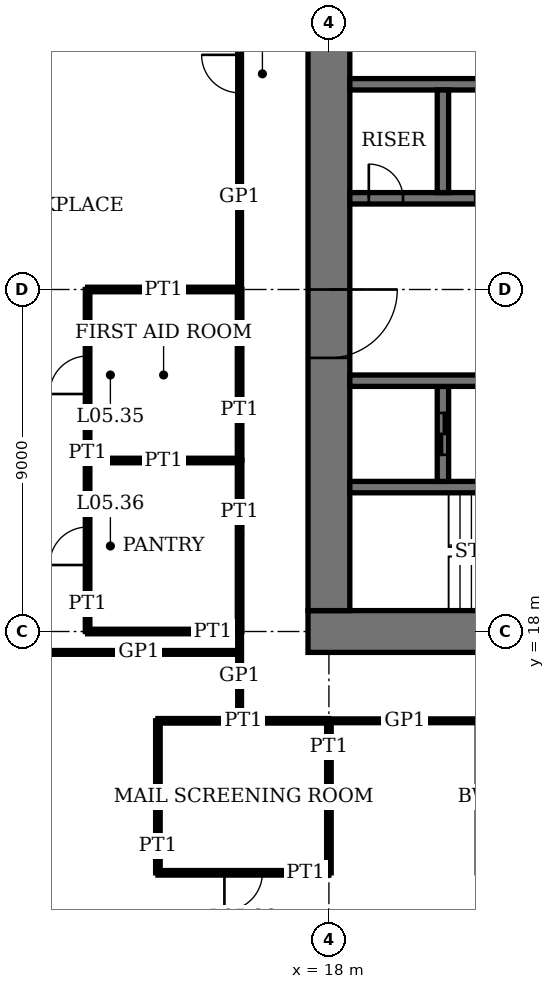
"""IFC4 building model, lengths in metres.
Left out: names, types, materials, properties, quantities, classifications, styles, units other than length and angle.
Written with IfcOpenShell. Run it as: python <this file> out.ifc"""

import sys

from ifc_helpers import new_model, si_unit, direction, frame, frame_2d, origin, place, context, subcontext, project, spatial, rectangle, extrude, element, fill, save


model = new_model("IFC4")
c1 = context("Model", 3, precision=1e-05, world=origin(), true_north=direction((0.0, 1.0)))
c2 = subcontext(c1, "Body", "Model", "MODEL_VIEW")
j1 = project(units=[si_unit("LENGTHUNIT", "METRE"), si_unit("PLANEANGLEUNIT", "RADIAN")], contexts=[c1])
p1 = place(None, origin())
s1 = spatial("IfcSite", under=j1, at=p1, CompositionType="ELEMENT")
p2 = place(p1, origin())
s2 = spatial("IfcBuilding", under=s1, at=p2, CompositionType="ELEMENT")
p3 = place(p2, frame((0.0, 0.0, 23.8)))
s3 = spatial("IfcBuildingStorey", under=s2, at=p3, CompositionType="ELEMENT", Elevation=23.8)
p4 = place(p3, frame((17.45, 18.0, 0.0), z_axis=(0.0, 0.0, 1.0), x_axis=(1.0, 0.0, 0.0)))
e1 = element("IfcWall", 1, at=p4, inside=s3, PredefinedType="SHEAR", context=c2, shape_type="SweptSolid", body=[
    extrude(rectangle(XDim=28.1, YDim=1.1, at=frame_2d((14.05, 0.0))), origin(), (0.0, 0.0, 1.0), 4.0),
])
p5 = place(p4, frame((11.55, 0.0, 0.0)))
e2 = element("IfcOpeningElement", 2, at=p5, cuts=e1, PredefinedType="OPENING", context=c2, shape_type="SweptSolid", body=[
    extrude(rectangle(XDim=1.0, YDim=2.4, at=frame_2d((0.5, 1.2))), frame((0.0, 0.56, 0.0), z_axis=(0.0, -1.0, 0.0), x_axis=(1.0, 0.0, 0.0)), (0.0, 0.0, 1.0), 1.12),
])
p6 = place(p4, frame((16.55, 0.0, 0.0)))
e3 = element("IfcOpeningElement", 3, at=p6, cuts=e1, PredefinedType="OPENING", context=c2, shape_type="SweptSolid", body=[
    extrude(rectangle(XDim=1.0, YDim=2.4, at=frame_2d((0.5, 1.2))), frame((0.0, 0.56, 0.0), z_axis=(0.0, -1.0, 0.0), x_axis=(1.0, 0.0, 0.0)), (0.0, 0.0, 1.0), 1.12),
])
p7 = place(p4, frame((20.0, 0.0, 0.0)))
e4 = element("IfcOpeningElement", 4, at=p7, cuts=e1, PredefinedType="OPENING", context=c2, shape_type="SweptSolid", body=[
    extrude(rectangle(XDim=1.1, YDim=2.4, at=frame_2d((0.55, 1.2))), frame((0.0, 0.56, 0.0), z_axis=(0.0, -1.0, 0.0), x_axis=(1.0, 0.0, 0.0)), (0.0, 0.0, 1.0), 1.12),
])
p8 = place(p4, frame((24.05, 0.0, 0.0)))
e5 = element("IfcOpeningElement", 5, at=p8, cuts=e1, PredefinedType="OPENING", context=c2, shape_type="SweptSolid", body=[
    extrude(rectangle(XDim=1.0, YDim=2.4, at=frame_2d((0.5, 1.2))), frame((0.0, 0.56, 0.0), z_axis=(0.0, -1.0, 0.0), x_axis=(1.0, 0.0, 0.0)), (0.0, 0.0, 1.0), 1.12),
])
p9 = place(p3, frame((18.0, 35.45, 0.0), z_axis=(0.0, 0.0, 1.0), x_axis=(0.0, -1.0, 0.0)))
e6 = element("IfcWall", 6, at=p9, inside=s3, PredefinedType="SHEAR", context=c2, shape_type="SweptSolid", body=[
    extrude(rectangle(XDim=16.9, YDim=1.1, at=frame_2d((8.45, 0.0))), origin(), (0.0, 0.0, 1.0), 4.0),
])
p10 = place(p9, frame((8.45, 0.0, 0.0)))
e7 = element("IfcOpeningElement", 7, at=p10, cuts=e6, PredefinedType="OPENING", context=c2, shape_type="SweptSolid", body=[
    extrude(rectangle(XDim=1.8, YDim=2.4, at=frame_2d((0.9, 1.2))), frame((0.0, 0.56, 0.0), z_axis=(0.0, -1.0, 0.0), x_axis=(1.0, 0.0, 0.0)), (0.0, 0.0, 1.0), 1.12),
])
p11 = place(p3, frame((18.55, 21.8, 0.0), z_axis=(0.0, 0.0, 1.0), x_axis=(1.0, 0.0, 0.0)))
e8 = element("IfcWall", 8, at=p11, inside=s3, PredefinedType="SHEAR", context=c2, shape_type="SweptSolid", body=[
    extrude(rectangle(XDim=8.3, YDim=0.3, at=frame_2d((4.15, 0.0))), origin(), (0.0, 0.0, 1.0), 4.0),
])
p12 = place(p11, frame((6.85, 0.0, 0.0)))
e9 = element("IfcOpeningElement", 9, at=p12, cuts=e8, PredefinedType="OPENING", context=c2, shape_type="SweptSolid", body=[
    extrude(rectangle(XDim=1.0, YDim=2.4, at=frame_2d((0.5, 1.2))), frame((0.0, 0.16, 0.0), z_axis=(0.0, -1.0, 0.0), x_axis=(1.0, 0.0, 0.0)), (0.0, 0.0, 1.0), 0.32),
])
p13 = place(p3, frame((21.0, 21.95, 0.0), z_axis=(0.0, 0.0, 1.0), x_axis=(0.0, 1.0, 0.0)))
e10 = element("IfcWall", 10, at=p13, inside=s3, PredefinedType="SHEAR", context=c2, shape_type="SweptSolid", body=[
    extrude(rectangle(XDim=2.5, YDim=0.3, at=frame_2d((1.25, 0.0))), origin(), (0.0, 0.0, 1.0), 4.0),
])
p14 = place(p13, frame((0.7, 0.0, 0.0)))
e11 = element("IfcOpeningElement", 11, at=p14, cuts=e10, PredefinedType="OPENING", context=c2, shape_type="SweptSolid", body=[
    extrude(rectangle(XDim=1.1, YDim=2.4, at=frame_2d((0.55, 1.2))), frame((0.0, 0.16, 0.0), z_axis=(0.0, -1.0, 0.0), x_axis=(1.0, 0.0, 0.0)), (0.0, 0.0, 1.0), 0.32),
])
p15 = place(p3, frame((18.55, 24.6, 0.0), z_axis=(0.0, 0.0, 1.0), x_axis=(1.0, 0.0, 0.0)))
e12 = element("IfcWall", 12, at=p15, inside=s3, PredefinedType="SHEAR", context=c2, shape_type="SweptSolid", body=[
    extrude(rectangle(XDim=25.9, YDim=0.3, at=frame_2d((12.95, 0.0))), origin(), (0.0, 0.0, 1.0), 4.0),
])
p16 = place(p15, frame((4.95, 0.0, 0.0)))
e13 = element("IfcOpeningElement", 13, at=p16, cuts=e12, PredefinedType="OPENING", context=c2, shape_type="SweptSolid", body=[
    extrude(rectangle(XDim=1.0, YDim=2.4, at=frame_2d((0.5, 1.2))), frame((0.0, 0.16, 0.0), z_axis=(0.0, -1.0, 0.0), x_axis=(1.0, 0.0, 0.0)), (0.0, 0.0, 1.0), 0.32),
])
p17 = place(p15, frame((24.5, 0.0, 0.0)))
e14 = element("IfcOpeningElement", 14, at=p17, cuts=e12, PredefinedType="OPENING", context=c2, shape_type="SweptSolid", body=[
    extrude(rectangle(XDim=0.9, YDim=2.1, at=frame_2d((0.45, 1.05))), frame((0.0, 0.16, 0.0), z_axis=(0.0, -1.0, 0.0), x_axis=(1.0, 0.0, 0.0)), (0.0, 0.0, 1.0), 0.32),
])
p18 = place(p15, frame((9.4, 0.0, 0.0)))
e15 = element("IfcOpeningElement", 15, at=p18, cuts=e12, PredefinedType="OPENING", context=c2, shape_type="SweptSolid", body=[
    extrude(rectangle(XDim=1.1, YDim=2.4, at=frame_2d((0.55, 1.2))), frame((0.0, 0.16, 0.0), z_axis=(0.0, -1.0, 0.0), x_axis=(1.0, 0.0, 0.0)), (0.0, 0.0, 1.0), 0.32),
])
p19 = place(p15, frame((12.4, 0.0, 0.0)))
e16 = element("IfcOpeningElement", 16, at=p19, cuts=e12, PredefinedType="OPENING", context=c2, shape_type="SweptSolid", body=[
    extrude(rectangle(XDim=1.1, YDim=2.4, at=frame_2d((0.55, 1.2))), frame((0.0, 0.16, 0.0), z_axis=(0.0, -1.0, 0.0), x_axis=(1.0, 0.0, 0.0)), (0.0, 0.0, 1.0), 0.32),
])
p20 = place(p15, frame((15.4, 0.0, 0.0)))
e17 = element("IfcOpeningElement", 17, at=p20, cuts=e12, PredefinedType="OPENING", context=c2, shape_type="SweptSolid", body=[
    extrude(rectangle(XDim=1.1, YDim=2.4, at=frame_2d((0.55, 1.2))), frame((0.0, 0.16, 0.0), z_axis=(0.0, -1.0, 0.0), x_axis=(1.0, 0.0, 0.0)), (0.0, 0.0, 1.0), 0.32),
])
p21 = place(p15, frame((18.4, 0.0, 0.0)))
e18 = element("IfcOpeningElement", 18, at=p21, cuts=e12, PredefinedType="OPENING", context=c2, shape_type="SweptSolid", body=[
    extrude(rectangle(XDim=1.1, YDim=2.4, at=frame_2d((0.55, 1.2))), frame((0.0, 0.16, 0.0), z_axis=(0.0, -1.0, 0.0), x_axis=(1.0, 0.0, 0.0)), (0.0, 0.0, 1.0), 0.32),
])
p22 = place(p15, frame((21.3, 0.0, 0.0)))
e19 = element("IfcOpeningElement", 19, at=p22, cuts=e12, PredefinedType="OPENING", context=c2, shape_type="SweptSolid", body=[
    extrude(rectangle(XDim=1.3, YDim=2.4, at=frame_2d((0.65, 1.2))), frame((0.0, 0.16, 0.0), z_axis=(0.0, -1.0, 0.0), x_axis=(1.0, 0.0, 0.0)), (0.0, 0.0, 1.0), 0.32),
])
p23 = place(p3, frame((18.55, 29.4, 0.0), z_axis=(0.0, 0.0, 1.0), x_axis=(1.0, 0.0, 0.0)))
e20 = element("IfcWall", 20, at=p23, inside=s3, PredefinedType="SHEAR", context=c2, shape_type="SweptSolid", body=[
    extrude(rectangle(XDim=25.9, YDim=0.3, at=frame_2d((12.95, 0.0))), origin(), (0.0, 0.0, 1.0), 4.0),
])
p24 = place(p23, frame((19.95, 0.0, 0.0)))
e21 = element("IfcOpeningElement", 21, at=p24, cuts=e20, PredefinedType="OPENING", context=c2, shape_type="SweptSolid", body=[
    extrude(rectangle(XDim=1.0, YDim=2.4, at=frame_2d((0.5, 1.2))), frame((0.0, 0.16, 0.0), z_axis=(0.0, -1.0, 0.0), x_axis=(1.0, 0.0, 0.0)), (0.0, 0.0, 1.0), 0.32),
])
p25 = place(p23, frame((0.5, 0.0, 0.0)))
e22 = element("IfcOpeningElement", 22, at=p25, cuts=e20, PredefinedType="OPENING", context=c2, shape_type="SweptSolid", body=[
    extrude(rectangle(XDim=0.9, YDim=2.1, at=frame_2d((0.45, 1.05))), frame((0.0, 0.16, 0.0), z_axis=(0.0, -1.0, 0.0), x_axis=(1.0, 0.0, 0.0)), (0.0, 0.0, 1.0), 0.32),
])
p26 = place(p23, frame((3.3, 0.0, 0.0)))
e23 = element("IfcOpeningElement", 23, at=p26, cuts=e20, PredefinedType="OPENING", context=c2, shape_type="SweptSolid", body=[
    extrude(rectangle(XDim=1.3, YDim=2.4, at=frame_2d((0.65, 1.2))), frame((0.0, 0.16, 0.0), z_axis=(0.0, -1.0, 0.0), x_axis=(1.0, 0.0, 0.0)), (0.0, 0.0, 1.0), 0.32),
])
p27 = place(p3, frame((18.55, 32.4, 0.0), z_axis=(0.0, 0.0, 1.0), x_axis=(1.0, 0.0, 0.0)))
e24 = element("IfcWall", 24, at=p27, inside=s3, PredefinedType="SHEAR", context=c2, shape_type="SweptSolid", body=[
    extrude(rectangle(XDim=17.3, YDim=0.3, at=frame_2d((8.65, 0.0))), origin(), (0.0, 0.0, 1.0), 4.0),
])
p28 = place(p3, frame((21.0, 29.55, 0.0), z_axis=(0.0, 0.0, 1.0), x_axis=(0.0, 1.0, 0.0)))
e25 = element("IfcWall", 25, at=p28, inside=s3, PredefinedType="SHEAR", context=c2, shape_type="SweptSolid", body=[
    extrude(rectangle(XDim=2.7, YDim=0.3, at=frame_2d((1.35, 0.0))), origin(), (0.0, 0.0, 1.0), 4.0),
])
p29 = place(p3, frame((13.5, 11.65, 0.0), z_axis=(0.0, 0.0, 1.0), x_axis=(1.0, 0.0, 0.0)))
e26 = element("IfcWall", 26, at=p29, inside=s3, PredefinedType="PARTITIONING", context=c2, shape_type="SweptSolid", body=[
    extrude(rectangle(XDim=4.5, YDim=0.12, at=frame_2d((2.25, 0.0))), origin(), (0.0, 0.0, 1.0), 3.75),
])
p30 = place(p29, frame((1.75, 0.0, 0.0)))
e27 = element("IfcOpeningElement", 27, at=p30, cuts=e26, PredefinedType="OPENING", context=c2, shape_type="SweptSolid", body=[
    extrude(rectangle(XDim=1.0, YDim=2.4, at=frame_2d((0.5, 1.2))), frame((0.0, 0.07, 0.0), z_axis=(0.0, -1.0, 0.0), x_axis=(1.0, 0.0, 0.0)), (0.0, 0.0, 1.0), 0.14),
])
p31 = place(p3, frame((13.5, 15.65, 0.0), z_axis=(0.0, 0.0, 1.0), x_axis=(1.0, 0.0, 0.0)))
e28 = element("IfcWall", 28, at=p31, inside=s3, PredefinedType="PARTITIONING", context=c2, shape_type="SweptSolid", body=[
    extrude(rectangle(XDim=4.5, YDim=0.12, at=frame_2d((2.25, 0.0))), origin(), (0.0, 0.0, 1.0), 3.75),
])
p32 = place(p3, frame((18.0, 15.65, 0.0), z_axis=(0.0, 0.0, 1.0), x_axis=(1.0, 0.0, 0.0)))
e29 = element("IfcWall", 29, at=p32, inside=s3, PredefinedType="PARTITIONING", context=c2, shape_type="SweptSolid", body=[
    extrude(rectangle(XDim=4.0, YDim=0.1, at=frame_2d((2.0, 0.0))), origin(), (0.0, 0.0, 1.0), 3.75),
])
p33 = place(p3, frame((10.15, 17.45, 0.0), z_axis=(0.0, 0.0, 1.0), x_axis=(1.0, 0.0, 0.0)))
e30 = element("IfcWall", 30, at=p33, inside=s3, PredefinedType="PARTITIONING", context=c2, shape_type="SweptSolid", body=[
    extrude(rectangle(XDim=5.5, YDim=0.1, at=frame_2d((2.75, 0.0))), origin(), (0.0, 0.0, 1.0), 3.75),
])
p34 = place(p3, frame((11.65, 18.0, 0.0), z_axis=(0.0, 0.0, 1.0), x_axis=(1.0, 0.0, 0.0)))
e31 = element("IfcWall", 31, at=p34, inside=s3, PredefinedType="PARTITIONING", context=c2, shape_type="SweptSolid", body=[
    extrude(rectangle(XDim=4.0, YDim=0.12, at=frame_2d((2.0, 0.0))), origin(), (0.0, 0.0, 1.0), 3.05),
])
p35 = place(p3, frame((11.65, 22.5, 0.0), z_axis=(0.0, 0.0, 1.0), x_axis=(1.0, 0.0, 0.0)))
e32 = element("IfcWall", 32, at=p35, inside=s3, PredefinedType="PARTITIONING", context=c2, shape_type="SweptSolid", body=[
    extrude(rectangle(XDim=4.0, YDim=0.12, at=frame_2d((2.0, 0.0))), origin(), (0.0, 0.0, 1.0), 3.1),
])
p36 = place(p3, frame((11.65, 27.0, 0.0), z_axis=(0.0, 0.0, 1.0), x_axis=(1.0, 0.0, 0.0)))
e33 = element("IfcWall", 33, at=p36, inside=s3, PredefinedType="PARTITIONING", context=c2, shape_type="SweptSolid", body=[
    extrude(rectangle(XDim=4.0, YDim=0.12, at=frame_2d((2.0, 0.0))), origin(), (0.0, 0.0, 1.0), 3.05),
])
p37 = place(p3, frame((11.65, 22.5, 0.0), z_axis=(0.0, 0.0, 1.0), x_axis=(0.0, 1.0, 0.0)))
e34 = element("IfcWall", 34, at=p37, inside=s3, PredefinedType="PARTITIONING", context=c2, shape_type="SweptSolid", body=[
    extrude(rectangle(XDim=4.5, YDim=0.12, at=frame_2d((2.25, 0.0))), origin(), (0.0, 0.0, 1.0), 3.75),
])
p38 = place(p37, frame((1.75, 0.0, 0.0)))
e35 = element("IfcOpeningElement", 35, at=p38, cuts=e34, PredefinedType="OPENING", context=c2, shape_type="SweptSolid", body=[
    extrude(rectangle(XDim=1.0, YDim=2.4, at=frame_2d((0.5, 1.2))), frame((0.0, 0.07, 0.0), z_axis=(0.0, -1.0, 0.0), x_axis=(1.0, 0.0, 0.0)), (0.0, 0.0, 1.0), 0.14),
])
p39 = place(p3, frame((11.65, 18.0, 0.0), z_axis=(0.0, 0.0, 1.0), x_axis=(0.0, 1.0, 0.0)))
e36 = element("IfcWall", 36, at=p39, inside=s3, PredefinedType="PARTITIONING", context=c2, shape_type="SweptSolid", body=[
    extrude(rectangle(XDim=4.5, YDim=0.12, at=frame_2d((2.25, 0.0))), origin(), (0.0, 0.0, 1.0), 3.75),
])
p40 = place(p39, frame((1.75, 0.0, 0.0)))
e37 = element("IfcOpeningElement", 37, at=p40, cuts=e36, PredefinedType="OPENING", context=c2, shape_type="SweptSolid", body=[
    extrude(rectangle(XDim=1.0, YDim=2.4, at=frame_2d((0.5, 1.2))), frame((0.0, 0.07, 0.0), z_axis=(0.0, -1.0, 0.0), x_axis=(1.0, 0.0, 0.0)), (0.0, 0.0, 1.0), 0.14),
])
p41 = place(p3, frame((13.5, 11.65, 0.0), z_axis=(0.0, 0.0, 1.0), x_axis=(0.0, 1.0, 0.0)))
e38 = element("IfcWall", 38, at=p41, inside=s3, PredefinedType="PARTITIONING", context=c2, shape_type="SweptSolid", body=[
    extrude(rectangle(XDim=4.0, YDim=0.12, at=frame_2d((2.0, 0.0))), origin(), (0.0, 0.0, 1.0), 3.75),
])
for number, where, z_axis, x_axis in (
    (39, (15.65, 22.5, 0.0), (0.0, 0.0, 1.0), (0.0, 1.0, 0.0)),
    (40, (15.65, 18.0, 0.0), (0.0, 0.0, 1.0), (0.0, 1.0, 0.0)),
):
    element("IfcWall", number, at=place(p3, frame(where, z_axis=z_axis, x_axis=x_axis)), inside=s3, PredefinedType="PARTITIONING", context=c2, shape_type="SweptSolid", body=[
        extrude(rectangle(XDim=4.5, YDim=0.12, at=frame_2d((2.25, 0.0))), origin(), (0.0, 0.0, 1.0), 3.75),
    ])
p42 = place(p3, frame((15.65, 15.65, 0.0), z_axis=(0.0, 0.0, 1.0), x_axis=(0.0, 1.0, 0.0)))
e41 = element("IfcWall", 41, at=p42, inside=s3, PredefinedType="PARTITIONING", context=c2, shape_type="SweptSolid", body=[
    extrude(rectangle(XDim=2.35, YDim=0.1, at=frame_2d((1.175, 0.0))), origin(), (0.0, 0.0, 1.0), 3.75),
])
p43 = place(p3, frame((15.65, 27.0, 0.0), z_axis=(0.0, 0.0, 1.0), x_axis=(0.0, 1.0, 0.0)))
e42 = element("IfcWall", 42, at=p43, inside=s3, PredefinedType="PARTITIONING", context=c2, shape_type="SweptSolid", body=[
    extrude(rectangle(XDim=11.35, YDim=0.1, at=frame_2d((5.675, 0.0))), origin(), (0.0, 0.0, 1.0), 3.75),
])
p44 = place(p43, frame((5.175, 0.0, 0.0)))
e43 = element("IfcOpeningElement", 43, at=p44, cuts=e42, PredefinedType="OPENING", context=c2, shape_type="SweptSolid", body=[
    extrude(rectangle(XDim=1.0, YDim=2.4, at=frame_2d((0.5, 1.2))), frame((0.0, 0.06, 0.0), z_axis=(0.0, -1.0, 0.0), x_axis=(1.0, 0.0, 0.0)), (0.0, 0.0, 1.0), 0.12),
])
p45 = place(p3, frame((18.0, 11.65, 0.0), z_axis=(0.0, 0.0, 1.0), x_axis=(0.0, 1.0, 0.0)))
e44 = element("IfcWall", 44, at=p45, inside=s3, PredefinedType="PARTITIONING", context=c2, shape_type="SweptSolid", body=[
    extrude(rectangle(XDim=4.0, YDim=0.12, at=frame_2d((2.0, 0.0))), origin(), (0.0, 0.0, 1.0), 3.05),
])
p46 = place(p10, origin())
e45 = element("IfcDoor", 45, at=p46, inside=s3, OperationType="DOUBLE_DOOR_DOUBLE_SWING", PredefinedType="DOOR", context=c2, shape_type="SweptSolid", body=[
    extrude(rectangle(XDim=1.8, YDim=2.4, at=frame_2d((0.9, 1.2))), frame((0.0, 0.03, 0.0), z_axis=(0.0, -1.0, 0.0), x_axis=(1.0, 0.0, 0.0)), (0.0, 0.0, 1.0), 0.06),
    extrude(rectangle(XDim=0.04, YDim=2.4, at=frame_2d((0.02, 1.2))), frame((0.0, 0.55, 0.0), z_axis=(0.0, -1.0, 0.0), x_axis=(1.0, 0.0, 0.0)), (0.0, 0.0, 1.0), 1.1),
    extrude(rectangle(XDim=0.04, YDim=2.4, at=frame_2d((1.78, 1.2))), frame((0.0, 0.55, 0.0), z_axis=(0.0, -1.0, 0.0), x_axis=(1.0, 0.0, 0.0)), (0.0, 0.0, 1.0), 1.1),
    extrude(rectangle(XDim=1.8, YDim=0.04, at=frame_2d((0.9, 2.38))), frame((0.0, 0.55, 0.0), z_axis=(0.0, -1.0, 0.0), x_axis=(1.0, 0.0, 0.0)), (0.0, 0.0, 1.0), 1.1),
])
fill(e7, e45)
p47 = place(p25, origin())
e46 = element("IfcDoor", 46, at=p47, inside=s3, OperationType="SINGLE_SWING_RIGHT", PredefinedType="DOOR", context=c2, shape_type="SweptSolid", body=[
    extrude(rectangle(XDim=0.9, YDim=2.1, at=frame_2d((0.45, 1.05))), frame((0.0, 0.03, 0.0), z_axis=(0.0, -1.0, 0.0), x_axis=(1.0, 0.0, 0.0)), (0.0, 0.0, 1.0), 0.06),
])
fill(e22, e46)
p48 = place(p30, origin())
e47 = element("IfcDoor", 47, at=p48, inside=s3, OperationType="SINGLE_SWING_LEFT", PredefinedType="DOOR", context=c2, shape_type="SweptSolid", body=[
    extrude(rectangle(XDim=1.0, YDim=2.4, at=frame_2d((0.5, 1.2))), frame((0.0, 0.025, 0.0), z_axis=(0.0, -1.0, 0.0), x_axis=(1.0, 0.0, 0.0)), (0.0, 0.0, 1.0), 0.05),
])
fill(e27, e47)
p49 = place(p38, origin())
e48 = element("IfcDoor", 48, at=p49, inside=s3, OperationType="SINGLE_SWING_RIGHT", PredefinedType="DOOR", context=c2, shape_type="SweptSolid", body=[
    extrude(rectangle(XDim=1.0, YDim=2.4, at=frame_2d((0.5, 1.2))), frame((0.0, 0.025, 0.0), z_axis=(0.0, -1.0, 0.0), x_axis=(1.0, 0.0, 0.0)), (0.0, 0.0, 1.0), 0.05),
])
fill(e35, e48)
p50 = place(p40, origin())
e49 = element("IfcDoor", 49, at=p50, inside=s3, OperationType="SINGLE_SWING_RIGHT", PredefinedType="DOOR", context=c2, shape_type="SweptSolid", body=[
    extrude(rectangle(XDim=1.0, YDim=2.4, at=frame_2d((0.5, 1.2))), frame((0.0, 0.025, 0.0), z_axis=(0.0, -1.0, 0.0), x_axis=(1.0, 0.0, 0.0)), (0.0, 0.0, 1.0), 0.05),
])
fill(e37, e49)
p51 = place(p44, origin())
e50 = element("IfcDoor", 50, at=p51, inside=s3, OperationType="SINGLE_SWING_LEFT", PredefinedType="DOOR", context=c2, shape_type="SweptSolid", body=[
    extrude(rectangle(XDim=1.0, YDim=2.4, at=frame_2d((0.5, 1.2))), frame((0.0, 0.02, 0.0), z_axis=(0.0, -1.0, 0.0), x_axis=(1.0, 0.0, 0.0)), (0.0, 0.0, 1.0), 0.04),
])
fill(e43, e50)
p52 = place(p26, origin())
e51 = element("IfcDoor", 51, at=p52, inside=s3, OperationType="DOUBLE_DOOR_SLIDING", PredefinedType="DOOR", context=c2, shape_type="SweptSolid", body=[
    extrude(rectangle(XDim=1.3, YDim=2.4, at=frame_2d((0.65, 1.2))), frame((0.0, 0.02, 0.0), z_axis=(0.0, -1.0, 0.0), x_axis=(1.0, 0.0, 0.0)), (0.0, 0.0, 1.0), 0.04),
])
fill(e23, e51)
p53 = place(p14, origin())
e52 = element("IfcDoor", 52, at=p53, inside=s3, OperationType="DOUBLE_DOOR_SLIDING", PredefinedType="DOOR", context=c2, shape_type="SweptSolid", body=[
    extrude(rectangle(XDim=1.1, YDim=2.4, at=frame_2d((0.55, 1.2))), frame((0.0, 0.03, 0.0), z_axis=(0.0, -1.0, 0.0), x_axis=(1.0, 0.0, 0.0)), (0.0, 0.0, 1.0), 0.06),
])
fill(e11, e52)
save(model, sys.argv[1])
